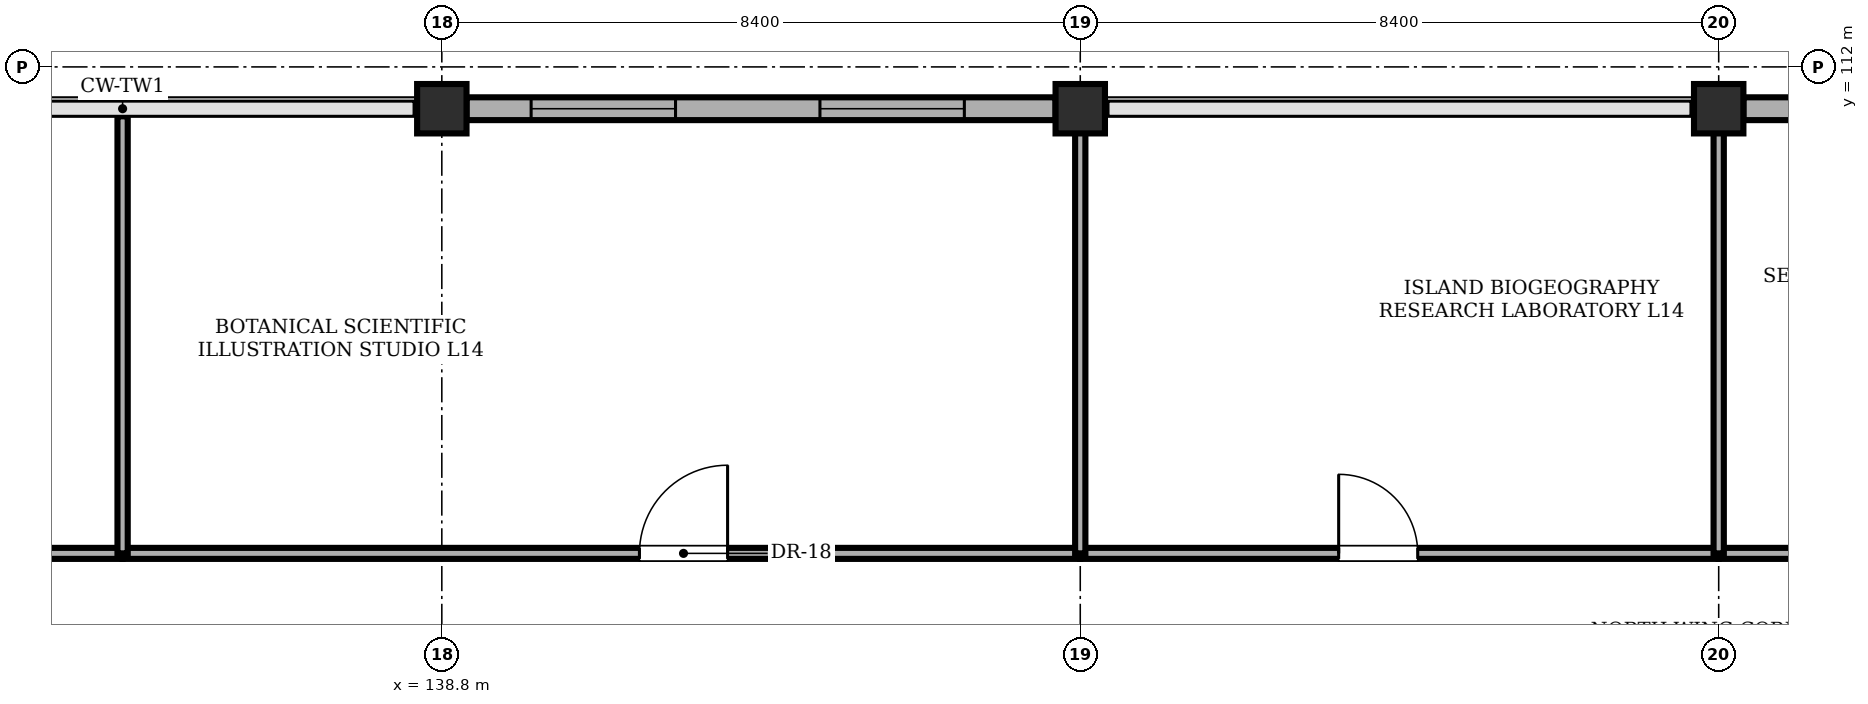
"""IFC4 building model, lengths in metres.
Left out: names, types, materials, properties, quantities, classifications, styles, units other than length and angle.
Written with IfcOpenShell. Run it as: python <this file> out.ifc"""

import sys

from ifc_helpers import new_model, si_unit, direction, frame, frame_2d, origin, origin_2d, place, context, subcontext, project, spatial, rectangle, extrude, element, fill, save


model = new_model("IFC4")
c1 = context("Model", 3, precision=1e-05, world=origin(), true_north=direction((0.0, 1.0)))
c2 = subcontext(c1, "Body", "Model", "MODEL_VIEW")
j1 = project(units=[si_unit("LENGTHUNIT", "METRE"), si_unit("PLANEANGLEUNIT", "RADIAN")], contexts=[c1])
p1 = place(None, origin())
s1 = spatial("IfcSite", under=j1, at=p1, CompositionType="ELEMENT")
p2 = place(p1, origin())
s2 = spatial("IfcBuilding", under=s1, at=p2, CompositionType="ELEMENT")
p3 = place(p2, frame((0.0, 0.0, 57.0)))
s3 = spatial("IfcBuildingStorey", under=s2, at=p3, CompositionType="ELEMENT", Elevation=57.0)
for number, where, z_axis, x_axis in (
    (1, (138.8, 111.45, 0.0), (0.0, 0.0, 1.0), (1.0, 0.0, 0.0)),
    (2, (147.2, 111.45, 0.0), (0.0, 0.0, 1.0), (1.0, 0.0, 0.0)),
    (3, (155.6, 111.45, 0.0), (0.0, 0.0, 1.0), (1.0, 0.0, 0.0)),
):
    element("IfcColumn", number, at=place(p3, frame(where, z_axis=z_axis, x_axis=x_axis)), inside=s3, PredefinedType="COLUMN", context=c2, shape_type="SweptSolid", body=[
        extrude(rectangle(XDim=0.65, YDim=0.65, at=origin_2d()), origin(), (0.0, 0.0, 1.0), 4.02),
    ])
p4 = place(p3, frame((139.125, 111.45, 0.0), z_axis=(0.0, 0.0, 1.0), x_axis=(1.0, 0.0, 0.0)))
e4 = element("IfcWall", 4, at=p4, inside=s3, PredefinedType="STANDARD", context=c2, shape_type="SweptSolid", body=[
    extrude(rectangle(XDim=7.75, YDim=0.3, at=frame_2d((3.875, 0.0))), origin(), (0.0, 0.0, 1.0), 3.32),
])
p5 = place(p4, frame((0.85, 0.0, 0.9)))
e5 = element("IfcOpeningElement", 5, at=p5, cuts=e4, PredefinedType="OPENING", context=c2, shape_type="SweptSolid", body=[
    extrude(rectangle(XDim=1.9, YDim=2.1, at=frame_2d((0.95, 1.05))), frame((0.0, 0.16, 0.0), z_axis=(0.0, -1.0, 0.0), x_axis=(1.0, 0.0, 0.0)), (0.0, 0.0, 1.0), 0.32),
])
p6 = place(p4, frame((4.65, 0.0, 0.9)))
e6 = element("IfcOpeningElement", 6, at=p6, cuts=e4, PredefinedType="OPENING", context=c2, shape_type="SweptSolid", body=[
    extrude(rectangle(XDim=1.9, YDim=2.1, at=frame_2d((0.95, 1.05))), frame((0.0, 0.16, 0.0), z_axis=(0.0, -1.0, 0.0), x_axis=(1.0, 0.0, 0.0)), (0.0, 0.0, 1.0), 0.32),
])
p7 = place(p3, frame((155.925, 111.45, 0.0), z_axis=(0.0, 0.0, 1.0), x_axis=(1.0, 0.0, 0.0)))
e7 = element("IfcWall", 7, at=p7, inside=s3, PredefinedType="STANDARD", context=c2, shape_type="SweptSolid", body=[
    extrude(rectangle(XDim=7.2, YDim=0.3, at=frame_2d((3.6, 0.0))), origin(), (0.0, 0.0, 1.0), 3.32),
])
p8 = place(p7, frame((0.85, 0.0, 0.9)))
e8 = element("IfcOpeningElement", 8, at=p8, cuts=e7, PredefinedType="OPENING", context=c2, shape_type="SweptSolid", body=[
    extrude(rectangle(XDim=1.9, YDim=2.1, at=frame_2d((0.95, 1.05))), frame((0.0, 0.16, 0.0), z_axis=(0.0, -1.0, 0.0), x_axis=(1.0, 0.0, 0.0)), (0.0, 0.0, 1.0), 0.32),
])
p9 = place(p7, frame((4.65, 0.0, 0.9)))
e9 = element("IfcOpeningElement", 9, at=p9, cuts=e7, PredefinedType="OPENING", context=c2, shape_type="SweptSolid", body=[
    extrude(rectangle(XDim=1.9, YDim=2.1, at=frame_2d((0.95, 1.05))), frame((0.0, 0.16, 0.0), z_axis=(0.0, -1.0, 0.0), x_axis=(1.0, 0.0, 0.0)), (0.0, 0.0, 1.0), 0.32),
])
p10 = place(p3, frame((122.15, 105.6, 0.0), z_axis=(0.0, 0.0, 1.0), x_axis=(1.0, 0.0, 0.0)))
e10 = element("IfcWall", 10, at=p10, inside=s3, PredefinedType="PARTITIONING", context=c2, shape_type="SweptSolid", body=[
    extrude(rectangle(XDim=12.45, YDim=0.145, at=frame_2d((6.225, 0.0))), origin(), (0.0, 0.0, 1.0), 4.02),
])
p11 = place(p10, frame((3.75, 0.0, 0.0)))
e11 = element("IfcOpeningElement", 11, at=p11, cuts=e10, PredefinedType="OPENING", context=c2, shape_type="SweptSolid", body=[
    extrude(rectangle(XDim=1.04, YDim=2.16, at=frame_2d((0.52, 1.08))), frame((0.0, 0.083, 0.0), z_axis=(0.0, -1.0, 0.0), x_axis=(1.0, 0.0, 0.0)), (0.0, 0.0, 1.0), 0.165),
])
p12 = place(p3, frame((134.6, 105.6, 0.0), z_axis=(0.0, 0.0, 1.0), x_axis=(1.0, 0.0, 0.0)))
e12 = element("IfcWall", 12, at=p12, inside=s3, PredefinedType="PARTITIONING", context=c2, shape_type="SweptSolid", body=[
    extrude(rectangle(XDim=12.6, YDim=0.145, at=frame_2d((6.3, 0.0))), origin(), (0.0, 0.0, 1.0), 4.02),
])
p13 = place(p12, frame((6.8, 0.0, 0.0)))
e13 = element("IfcOpeningElement", 13, at=p13, cuts=e12, PredefinedType="OPENING", context=c2, shape_type="SweptSolid", body=[
    extrude(rectangle(XDim=1.16, YDim=2.2, at=frame_2d((0.58, 1.1))), frame((0.0, 0.083, 0.0), z_axis=(0.0, -1.0, 0.0), x_axis=(1.0, 0.0, 0.0)), (0.0, 0.0, 1.0), 0.165),
])
p14 = place(p3, frame((134.6, 105.6, 0.0), z_axis=(0.0, 0.0, 1.0), x_axis=(0.0, 1.0, 0.0)))
e14 = element("IfcWall", 14, at=p14, inside=s3, PredefinedType="PARTITIONING", context=c2, shape_type="SweptSolid", body=[
    extrude(rectangle(XDim=5.75, YDim=0.135, at=frame_2d((2.875, 0.0))), origin(), (0.0, 0.0, 1.0), 3.57),
])
p15 = place(p3, frame((147.2, 105.6, 0.0), z_axis=(0.0, 0.0, 1.0), x_axis=(1.0, 0.0, 0.0)))
e15 = element("IfcWall", 15, at=p15, inside=s3, PredefinedType="PARTITIONING", context=c2, shape_type="SweptSolid", body=[
    extrude(rectangle(XDim=8.4, YDim=0.145, at=frame_2d((4.2, 0.0))), origin(), (0.0, 0.0, 1.0), 4.02),
])
p16 = place(p15, frame((3.4, 0.0, 0.0)))
e16 = element("IfcOpeningElement", 16, at=p16, cuts=e15, PredefinedType="OPENING", context=c2, shape_type="SweptSolid", body=[
    extrude(rectangle(XDim=1.04, YDim=2.16, at=frame_2d((0.52, 1.08))), frame((0.0, 0.083, 0.0), z_axis=(0.0, -1.0, 0.0), x_axis=(1.0, 0.0, 0.0)), (0.0, 0.0, 1.0), 0.165),
])
p17 = place(p3, frame((147.2, 105.6, 0.0), z_axis=(0.0, 0.0, 1.0), x_axis=(0.0, 1.0, 0.0)))
e17 = element("IfcWall", 17, at=p17, inside=s3, PredefinedType="PARTITIONING", context=c2, shape_type="SweptSolid", body=[
    extrude(rectangle(XDim=5.75, YDim=0.135, at=frame_2d((2.875, 0.0))), origin(), (0.0, 0.0, 1.0), 3.32),
])
p18 = place(p3, frame((155.6, 105.6, 0.0), z_axis=(0.0, 0.0, 1.0), x_axis=(1.0, 0.0, 0.0)))
e18 = element("IfcWall", 18, at=p18, inside=s3, PredefinedType="PARTITIONING", context=c2, shape_type="SweptSolid", body=[
    extrude(rectangle(XDim=7.75, YDim=0.145, at=frame_2d((3.875, 0.0))), origin(), (0.0, 0.0, 1.0), 4.02),
])
p19 = place(p18, frame((3.4, 0.0, 0.0)))
e19 = element("IfcOpeningElement", 19, at=p19, cuts=e18, PredefinedType="OPENING", context=c2, shape_type="SweptSolid", body=[
    extrude(rectangle(XDim=1.16, YDim=2.2, at=frame_2d((0.58, 1.1))), frame((0.0, 0.083, 0.0), z_axis=(0.0, -1.0, 0.0), x_axis=(1.0, 0.0, 0.0)), (0.0, 0.0, 1.0), 0.165),
])
p20 = place(p3, frame((155.6, 105.6, 0.0), z_axis=(0.0, 0.0, 1.0), x_axis=(0.0, 1.0, 0.0)))
e20 = element("IfcWall", 20, at=p20, inside=s3, PredefinedType="PARTITIONING", context=c2, shape_type="SweptSolid", body=[
    extrude(rectangle(XDim=5.75, YDim=0.135, at=frame_2d((2.875, 0.0))), origin(), (0.0, 0.0, 1.0), 3.32),
])
p21 = place(p5, origin())
e21 = element("IfcWindow", 21, at=p21, inside=s3, PartitioningType="DOUBLE_PANEL_VERTICAL", PredefinedType="WINDOW", context=c2, shape_type="SweptSolid", body=[
    extrude(rectangle(XDim=1.9, YDim=2.1, at=frame_2d((0.95, 1.05))), frame((0.0, 0.03, 0.0), z_axis=(0.0, -1.0, 0.0), x_axis=(1.0, 0.0, 0.0)), (0.0, 0.0, 1.0), 0.06),
])
fill(e5, e21)
p22 = place(p6, origin())
e22 = element("IfcWindow", 22, at=p22, inside=s3, PartitioningType="DOUBLE_PANEL_VERTICAL", PredefinedType="WINDOW", context=c2, shape_type="SweptSolid", body=[
    extrude(rectangle(XDim=1.9, YDim=2.1, at=frame_2d((0.95, 1.05))), frame((0.0, 0.03, 0.0), z_axis=(0.0, -1.0, 0.0), x_axis=(1.0, 0.0, 0.0)), (0.0, 0.0, 1.0), 0.06),
])
fill(e6, e22)
p23 = place(p13, origin())
e23 = element("IfcDoor", 23, at=p23, inside=s3, OperationType="SINGLE_SWING_RIGHT", PredefinedType="DOOR", context=c2, shape_type="SweptSolid", body=[
    extrude(rectangle(XDim=1.16, YDim=2.2, at=frame_2d((0.58, 1.1))), frame((0.0, 0.025, 0.0), z_axis=(0.0, -1.0, 0.0), x_axis=(1.0, 0.0, 0.0)), (0.0, 0.0, 1.0), 0.05),
])
fill(e13, e23)
p24 = place(p16, origin())
e24 = element("IfcDoor", 24, at=p24, inside=s3, OperationType="SINGLE_SWING_LEFT", PredefinedType="DOOR", context=c2, shape_type="SweptSolid", body=[
    extrude(rectangle(XDim=1.04, YDim=2.16, at=frame_2d((0.52, 1.08))), frame((0.0, 0.025, 0.0), z_axis=(0.0, -1.0, 0.0), x_axis=(1.0, 0.0, 0.0)), (0.0, 0.0, 1.0), 0.05),
])
fill(e16, e24)
save(model, sys.argv[1])
